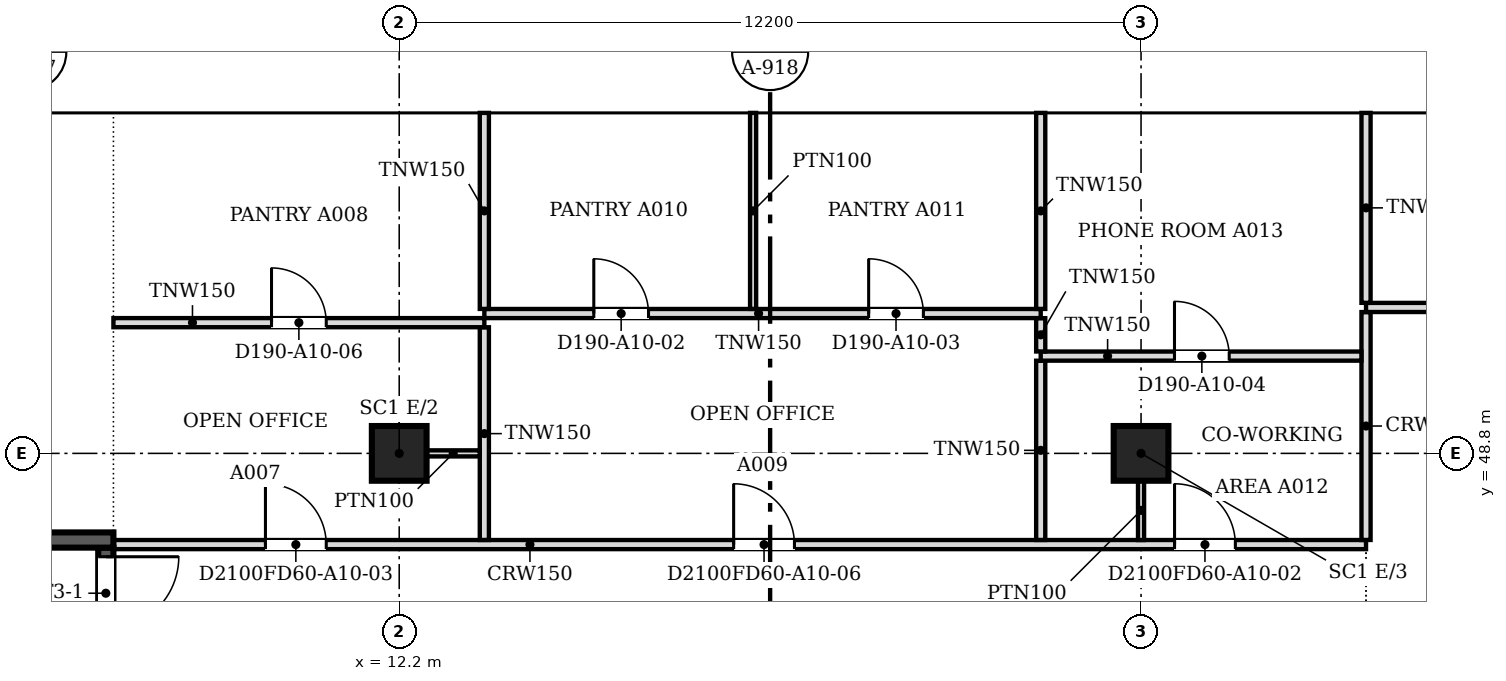
"""IFC4 building model, lengths in metres.
Left out: names, types, materials, properties, quantities, classifications, styles, units other than length and angle.
Written with IfcOpenShell. Run it as: python <this file> out.ifc"""

import sys

from ifc_helpers import new_model, si_unit, direction, frame, frame_2d, origin, origin_2d, place, context, subcontext, project, spatial, polyline, rectangle, outline, extrude, faceted_brep, source, transform, mapped, element, fill, save


model = new_model("IFC4")
c1 = context("Model", 3, precision=1e-05, world=origin(), true_north=direction((0.0, 1.0)))
c2 = subcontext(c1, "Body", "Model", "MODEL_VIEW")
j1 = project(units=[si_unit("LENGTHUNIT", "METRE"), si_unit("PLANEANGLEUNIT", "RADIAN")], contexts=[c1])
p1 = place(None, origin())
s1 = spatial("IfcSite", under=j1, at=p1, CompositionType="ELEMENT")
p2 = place(p1, origin())
s2 = spatial("IfcBuilding", under=s1, at=p2, CompositionType="ELEMENT")
p3 = place(p2, frame((0.0, 0.0, 116.4)))
s3 = spatial("IfcBuildingStorey", under=s2, at=p3, CompositionType="ELEMENT", Elevation=116.4)
for number, where, z_axis, x_axis in (
    (1, (12.2, 48.8, 0.0), (0.0, 0.0, 1.0), (1.0, 0.0, 0.0)),
    (2, (24.4, 48.8, 0.0), (0.0, 0.0, 1.0), (1.0, 0.0, 0.0)),
):
    element("IfcColumn", number, at=place(p3, frame(where, z_axis=z_axis, x_axis=x_axis)), inside=s3, PredefinedType="COLUMN", context=c2, shape_type="SweptSolid", body=[
        extrude(rectangle(XDim=0.9, YDim=0.9, at=origin_2d()), origin(), (0.0, 0.0, 1.0), 3.6),
    ])
m1 = source(origin(), c2, "Body", "SweptSolid", [
    extrude(outline(polyline([(3.05, 0.0), (6.1, 3.8), (3.05, 7.6), (0.0, 3.8), (3.05, 0.0)])), frame((0.0, 0.25, 0.0), z_axis=(0.0, -1.0, 0.0), x_axis=(1.0, 0.0, 0.0)), (0.0, 0.0, 1.0), 0.5),
])
p4 = place(p3, frame((30.5, 54.65, -3.8), z_axis=(0.0, 0.0, 1.0), x_axis=(-1.0, 0.0, 0.0)))
e3 = element("IfcWall", 3, at=p4, inside=s3, PredefinedType="SOLIDWALL", context=c2, shape_type="MappedRepresentation", body=[
    mapped(m1, transform((0.0, 0.0, 0.0), scale=1.0)),
])
m2 = source(origin(), c2, "Body", "SweptSolid", [
    extrude(outline(polyline([(3.05, 0.399), (5.78, 3.8), (3.05, 7.2), (0.321, 3.8), (3.05, 0.399)])), frame((0.0, 0.26, 0.0), z_axis=(0.0, -1.0, 0.0), x_axis=(1.0, 0.0, 0.0)), (0.0, 0.0, 1.0), 0.52),
])
p5 = place(p4, origin())
e4 = element("IfcOpeningElement", 4, at=p5, cuts=e3, PredefinedType="OPENING", context=c2, shape_type="MappedRepresentation", body=[
    mapped(m2, transform((0.0, 0.0, 0.0), scale=1.0)),
])
m3 = source(origin(), c2, "Body", "Brep", [
    faceted_brep([(3.05, -0.25, 0.0), (6.1, -0.25, 3.8), (6.1, -0.25, 3.8), (3.05, -0.25, 7.6), (0.0, -0.25, 3.8), (0.0, 0.25, 3.8), (3.05, 0.25, 7.6), (6.1, 0.25, 3.8), (6.1, 0.25, 3.8), (3.05, 0.25, 0.0)], [[[0, 1, 2, 3, 4]], [[5, 6, 7, 8, 9]], [[9, 8, 1, 0]], [[7, 6, 3, 2]], [[6, 5, 4, 3]], [[5, 9, 0, 4]], [[1, 8, 7, 2]]]),
])
p6 = place(p3, frame((24.4, 54.65, -3.8), z_axis=(0.0, 0.0, 1.0), x_axis=(-1.0, 0.0, 0.0)))
e5 = element("IfcWall", 5, at=p6, inside=s3, PredefinedType="SOLIDWALL", context=c2, shape_type="MappedRepresentation", body=[
    mapped(m3, transform((0.0, 0.0, 0.0), scale=1.0)),
])
p7 = place(p6, origin())
e6 = element("IfcOpeningElement", 6, at=p7, cuts=e5, PredefinedType="OPENING", context=c2, shape_type="MappedRepresentation", body=[
    mapped(m2, transform((0.0, 0.0, 0.0), scale=1.0)),
])
p8 = place(p3, frame((18.3, 54.65, -3.8), z_axis=(0.0, 0.0, 1.0), x_axis=(-1.0, 0.0, 0.0)))
e7 = element("IfcWall", 7, at=p8, inside=s3, PredefinedType="SOLIDWALL", context=c2, shape_type="MappedRepresentation", body=[
    mapped(m1, transform((0.0, 0.0, 0.0), scale=1.0)),
])
p9 = place(p8, origin())
e8 = element("IfcOpeningElement", 8, at=p9, cuts=e7, PredefinedType="OPENING", context=c2, shape_type="MappedRepresentation", body=[
    mapped(m2, transform((0.0, 0.0, 0.0), scale=1.0)),
])
m4 = source(origin(), c2, "Body", "Brep", [
    faceted_brep([(3.05, -0.25, 0.0), (6.053, -0.25, 3.8), (3.05, -0.25, 7.6), (0.0, -0.25, 3.8), (0.0, 0.25, 3.8), (3.05, 0.25, 7.6), (6.007, 0.25, 3.859), (6.007, 0.25, 3.741), (3.05, 0.25, 0.0), (6.053, 0.0, 3.8)], [[[0, 1, 2, 3]], [[4, 5, 6, 7, 8]], [[8, 7, 9, 1, 0]], [[6, 5, 2, 1, 9]], [[5, 4, 3, 2]], [[4, 8, 0, 3]], [[9, 7, 6]]]),
])
p10 = place(p3, frame((12.2, 54.65, -3.8), z_axis=(0.0, 0.0, 1.0), x_axis=(-1.0, 0.0, 0.0)))
e9 = element("IfcWall", 9, at=p10, inside=s3, PredefinedType="SOLIDWALL", context=c2, shape_type="MappedRepresentation", body=[
    mapped(m4, transform((0.0, 0.0, 0.0), scale=1.0)),
])
m5 = source(origin(), c2, "Body", "SweptSolid", [
    extrude(outline(polyline([(3.049, 0.401), (5.735, 3.8), (3.049, 7.199), (0.321, 3.8), (3.049, 0.401)])), frame((0.0, 0.26, 0.0), z_axis=(0.0, -1.0, 0.0), x_axis=(1.0, 0.0, 0.0)), (0.0, 0.0, 1.0), 0.52),
])
p11 = place(p10, origin())
e10 = element("IfcOpeningElement", 10, at=p11, cuts=e9, PredefinedType="OPENING", context=c2, shape_type="MappedRepresentation", body=[
    mapped(m5, transform((0.0, 0.0, 0.0), scale=1.0)),
])
p12 = place(p2, frame((0.0, 0.0, 120.2)))
s4 = spatial("IfcBuildingStorey", under=s2, at=p12, CompositionType="ELEMENT", Elevation=120.2)
m6 = source(origin(), c2, "Body", "SweptSolid", [
    extrude(outline(polyline([(3.05, 0.0), (6.1, 3.8), (3.05, 7.6), (0.0, 3.8), (3.05, 0.0)])), frame((0.0, 0.25, 0.0), z_axis=(0.0, -1.0, 0.0), x_axis=(1.0, 0.0, 0.0)), (0.0, 0.0, 1.0), 0.5),
])
p13 = place(p12, frame((33.55, 54.65, -3.8), z_axis=(0.0, 0.0, 1.0), x_axis=(-1.0, 0.0, 0.0)))
e11 = element("IfcWall", 11, at=p13, inside=s4, PredefinedType="SOLIDWALL", context=c2, shape_type="MappedRepresentation", body=[
    mapped(m6, transform((0.0, 0.0, 0.0), scale=1.0)),
])
m7 = source(origin(), c2, "Body", "SweptSolid", [
    extrude(outline(polyline([(3.05, 0.399), (5.78, 3.8), (3.05, 7.201), (0.321, 3.8), (3.05, 0.399)])), frame((0.0, 0.26, 0.0), z_axis=(0.0, -1.0, 0.0), x_axis=(1.0, 0.0, 0.0)), (0.0, 0.0, 1.0), 0.52),
])
p14 = place(p13, origin())
e12 = element("IfcOpeningElement", 12, at=p14, cuts=e11, PredefinedType="OPENING", context=c2, shape_type="MappedRepresentation", body=[
    mapped(m7, transform((0.0, 0.0, 0.0), scale=1.0)),
])
m8 = source(origin(), c2, "Body", "Brep", [
    faceted_brep([(3.05, -0.25, 0.0), (6.1, -0.25, 3.8), (6.1, -0.25, 3.8), (3.05, -0.25, 7.6), (0.0, -0.25, 3.8), (0.0, 0.25, 3.8), (3.05, 0.25, 7.6), (6.1, 0.25, 3.8), (6.1, 0.25, 3.8), (3.05, 0.25, 0.0)], [[[0, 1, 2, 3, 4]], [[5, 6, 7, 8, 9]], [[9, 8, 1, 0]], [[7, 6, 3, 2]], [[6, 5, 4, 3]], [[5, 9, 0, 4]], [[1, 8, 7, 2]]]),
])
p15 = place(p12, frame((27.45, 54.65, -3.8), z_axis=(0.0, 0.0, 1.0), x_axis=(-1.0, 0.0, 0.0)))
e13 = element("IfcWall", 13, at=p15, inside=s4, PredefinedType="SOLIDWALL", context=c2, shape_type="MappedRepresentation", body=[
    mapped(m8, transform((0.0, 0.0, 0.0), scale=1.0)),
])
p16 = place(p15, origin())
e14 = element("IfcOpeningElement", 14, at=p16, cuts=e13, PredefinedType="OPENING", context=c2, shape_type="MappedRepresentation", body=[
    mapped(m7, transform((0.0, 0.0, 0.0), scale=1.0)),
])
p17 = place(p12, frame((21.35, 54.65, -3.8), z_axis=(0.0, 0.0, 1.0), x_axis=(-1.0, 0.0, 0.0)))
e15 = element("IfcWall", 15, at=p17, inside=s4, PredefinedType="SOLIDWALL", context=c2, shape_type="MappedRepresentation", body=[
    mapped(m6, transform((0.0, 0.0, 0.0), scale=1.0)),
])
p18 = place(p17, origin())
e16 = element("IfcOpeningElement", 16, at=p18, cuts=e15, PredefinedType="OPENING", context=c2, shape_type="MappedRepresentation", body=[
    mapped(m7, transform((0.0, 0.0, 0.0), scale=1.0)),
])
p19 = place(p12, frame((15.25, 54.65, -3.8), z_axis=(0.0, 0.0, 1.0), x_axis=(-1.0, 0.0, 0.0)))
e17 = element("IfcWall", 17, at=p19, inside=s4, PredefinedType="SOLIDWALL", context=c2, shape_type="MappedRepresentation", body=[
    mapped(m6, transform((0.0, 0.0, 0.0), scale=1.0)),
])
p20 = place(p19, origin())
e18 = element("IfcOpeningElement", 18, at=p20, cuts=e17, PredefinedType="OPENING", context=c2, shape_type="MappedRepresentation", body=[
    mapped(m7, transform((0.0, 0.0, 0.0), scale=1.0)),
])
m9 = source(origin(), c2, "Body", "Brep", [
    faceted_brep([(3.003, -0.25, 0.0), (3.05, -0.25, 0.06), (3.05, -0.25, 7.54), (3.003, -0.25, 7.6), (0.0, -0.25, 3.8), (0.0, 0.25, 3.8), (2.957, 0.25, 7.541), (2.957, 0.25, 0.059), (3.003, 0.0, 0.0), (3.003, 0.0, 7.6)], [[[0, 1, 2, 3, 4]], [[5, 6, 7]], [[1, 0, 8]], [[9, 3, 2]], [[6, 5, 4, 3, 9]], [[5, 7, 8, 0, 4]], [[1, 8, 7, 6, 9, 2]]]),
])
p21 = place(p12, frame((9.15, 54.65, -3.8), z_axis=(0.0, 0.0, 1.0), x_axis=(-1.0, 0.0, 0.0)))
e19 = element("IfcWall", 19, at=p21, inside=s4, PredefinedType="SOLIDWALL", context=c2, shape_type="MappedRepresentation", body=[
    mapped(m9, transform((0.0, 0.0, 0.0), scale=1.0)),
])
m10 = source(origin(), c2, "Body", "SweptSolid", [
    extrude(outline(polyline([(2.803, 6.944), (0.319, 3.8), (2.803, 0.656), (2.803, 6.944)])), frame((0.0, 0.26, 0.0), z_axis=(0.0, -1.0, 0.0), x_axis=(1.0, 0.0, 0.0)), (0.0, 0.0, 1.0), 0.52),
])
p22 = place(p21, origin())
e20 = element("IfcOpeningElement", 20, at=p22, cuts=e19, PredefinedType="OPENING", context=c2, shape_type="MappedRepresentation", body=[
    mapped(m10, transform((0.0, 0.0, 0.0), scale=1.0)),
])
p23 = place(p3, frame((3.6, 47.375, 0.0), z_axis=(0.0, 0.0, 1.0), x_axis=(1.0, 0.0, 0.0)))
e21 = element("IfcWall", 21, at=p23, inside=s3, PredefinedType="SOLIDWALL", context=c2, shape_type="SweptSolid", body=[
    extrude(rectangle(XDim=3.9, YDim=0.25, at=frame_2d((1.95, 0.0))), origin(), (0.0, 0.0, 1.0), 3.8),
])
p24 = place(p3, frame((7.375, 47.25, 0.0), z_axis=(0.0, 0.0, 1.0), x_axis=(0.0, -1.0, 0.0)))
e22 = element("IfcWall", 22, at=p24, inside=s3, PredefinedType="SOLIDWALL", context=c2, shape_type="SweptSolid", body=[
    extrude(rectangle(XDim=8.0, YDim=0.25, at=frame_2d((4.0, 0.0))), origin(), (0.0, 0.0, 1.0), 3.8),
])
m11 = source(origin(), c2, "Body", "SweptSolid", [
    extrude(rectangle(XDim=1.2, YDim=2.1, at=frame_2d((0.6, 1.05))), frame((0.0, 0.135, 0.0), z_axis=(0.0, -1.0, 0.0), x_axis=(1.0, 0.0, 0.0)), (0.0, 0.0, 1.0), 0.27),
])
p25 = place(p24, frame((0.15, 0.0, 0.0)))
e23 = element("IfcOpeningElement", 23, at=p25, cuts=e22, PredefinedType="OPENING", context=c2, shape_type="MappedRepresentation", body=[
    mapped(m11, transform((0.0, 0.0, 0.0), scale=1.0)),
])
p26 = place(p3, frame((7.5, 47.3, 0.0), z_axis=(0.0, 0.0, 1.0), x_axis=(1.0, 0.0, 0.0)))
e24 = element("IfcWall", 24, at=p26, inside=s3, PredefinedType="PARTITIONING", context=c2, shape_type="SweptSolid", body=[
    extrude(rectangle(XDim=20.6, YDim=0.15, at=frame_2d((10.3, 0.0))), origin(), (0.0, 0.0, 1.0), 3.067),
])
m12 = source(origin(), c2, "Body", "SweptSolid", [
    extrude(rectangle(XDim=1.0, YDim=2.1, at=frame_2d((0.5, 1.05))), frame((0.0, 0.085, 0.0), z_axis=(0.0, -1.0, 0.0), x_axis=(1.0, 0.0, 0.0)), (0.0, 0.0, 1.0), 0.17),
])
p27 = place(p26, frame((17.451, 0.0, 0.0)))
e25 = element("IfcOpeningElement", 25, at=p27, cuts=e24, PredefinedType="OPENING", context=c2, shape_type="MappedRepresentation", body=[
    mapped(m12, transform((0.0, 0.0, 0.0), scale=1.0)),
])
p28 = place(p26, frame((2.5, 0.0, 0.0)))
e26 = element("IfcOpeningElement", 26, at=p28, cuts=e24, PredefinedType="OPENING", context=c2, shape_type="MappedRepresentation", body=[
    mapped(m12, transform((0.0, 0.0, 0.0), scale=1.0)),
])
p29 = place(p26, frame((10.2, 0.0, 0.0)))
e27 = element("IfcOpeningElement", 27, at=p29, cuts=e24, PredefinedType="OPENING", context=c2, shape_type="MappedRepresentation", body=[
    mapped(m12, transform((0.0, 0.0, 0.0), scale=1.0)),
])
p30 = place(p3, frame((13.6, 47.376, 0.0), z_axis=(0.0, 0.0, 1.0), x_axis=(0.0, 1.0, 0.0)))
e28 = element("IfcWall", 28, at=p30, inside=s3, PredefinedType="PARTITIONING", context=c2, shape_type="SweptSolid", body=[
    extrude(rectangle(XDim=3.498, YDim=0.15, at=frame_2d((1.749, 0.0))), origin(), (0.0, 0.0, 1.0), 3.067),
])
p31 = place(p3, frame((22.75, 47.376, 0.0), z_axis=(0.0, 0.0, 1.0), x_axis=(0.0, 1.0, 0.0)))
e29 = element("IfcWall", 29, at=p31, inside=s3, PredefinedType="PARTITIONING", context=c2, shape_type="SweptSolid", body=[
    extrude(rectangle(XDim=2.948, YDim=0.15, at=frame_2d((1.474, 0.0))), origin(), (0.0, 0.0, 1.0), 3.067),
])
p32 = place(p3, frame((28.1, 47.376, 0.0), z_axis=(0.0, 0.0, 1.0), x_axis=(0.0, 1.0, 0.0)))
e30 = element("IfcWall", 30, at=p32, inside=s3, PredefinedType="PARTITIONING", context=c2, shape_type="SweptSolid", body=[
    extrude(rectangle(XDim=3.748, YDim=0.15, at=frame_2d((1.874, 0.0))), origin(), (0.0, 0.0, 1.0), 3.067),
])
p33 = place(p3, frame((24.4, 48.35, 0.0), z_axis=(0.0, 0.0, 1.0), x_axis=(0.0, -1.0, 0.0)))
e31 = element("IfcWall", 31, at=p33, inside=s3, PredefinedType="PARTITIONING", context=c2, shape_type="SweptSolid", body=[
    extrude(rectangle(XDim=0.975, YDim=0.1, at=frame_2d((0.488, 0.0))), origin(), (0.0, 0.0, 1.0), 3.067),
])
p34 = place(p3, frame((12.65, 48.8, 0.0), z_axis=(0.0, 0.0, 1.0), x_axis=(1.0, 0.0, 0.0)))
e32 = element("IfcWall", 32, at=p34, inside=s3, PredefinedType="PARTITIONING", context=c2, shape_type="SweptSolid", body=[
    extrude(rectangle(XDim=0.875, YDim=0.1, at=frame_2d((0.438, 0.0))), origin(), (0.0, 0.0, 1.0), 3.067),
])
p35 = place(p3, frame((22.75, 50.4, 0.0), z_axis=(0.0, 0.0, 1.0), x_axis=(1.0, 0.0, 0.0)))
e33 = element("IfcWall", 33, at=p35, inside=s3, PredefinedType="PARTITIONING", context=c2, shape_type="SweptSolid", body=[
    extrude(rectangle(XDim=5.274, YDim=0.15, at=frame_2d((2.637, 0.0))), origin(), (0.0, 0.0, 1.0), 3.067),
])
m13 = source(origin(), c2, "Body", "SweptSolid", [
    extrude(rectangle(XDim=0.9, YDim=2.1, at=frame_2d((0.45, 1.05))), frame((0.0, 0.085, 0.0), z_axis=(0.0, -1.0, 0.0), x_axis=(1.0, 0.0, 0.0)), (0.0, 0.0, 1.0), 0.17),
])
p36 = place(p35, frame((2.2, 0.0, 0.0)))
e34 = element("IfcOpeningElement", 34, at=p36, cuts=e33, PredefinedType="OPENING", context=c2, shape_type="MappedRepresentation", body=[
    mapped(m13, transform((0.0, 0.0, 0.0), scale=1.0)),
])
p37 = place(p3, frame((22.75, 50.476, 0.0), z_axis=(0.0, 0.0, 1.0), x_axis=(0.0, 1.0, 0.0)))
e35 = element("IfcWall", 35, at=p37, inside=s3, PredefinedType="PARTITIONING", context=c2, shape_type="SweptSolid", body=[
    extrude(rectangle(XDim=0.548, YDim=0.15, at=frame_2d((0.274, 0.0))), origin(), (0.0, 0.0, 1.0), 3.067),
])
p38 = place(p3, frame((7.5, 50.95, 0.0), z_axis=(0.0, 0.0, 1.0), x_axis=(1.0, 0.0, 0.0)))
e36 = element("IfcWall", 36, at=p38, inside=s3, PredefinedType="PARTITIONING", context=c2, shape_type="SweptSolid", body=[
    extrude(rectangle(XDim=6.1, YDim=0.15, at=frame_2d((3.05, 0.0))), origin(), (0.0, 0.0, 1.0), 3.067),
])
p39 = place(p38, frame((2.6, 0.0, 0.0)))
e37 = element("IfcOpeningElement", 37, at=p39, cuts=e36, PredefinedType="OPENING", context=c2, shape_type="MappedRepresentation", body=[
    mapped(m13, transform((0.0, 0.0, 0.0), scale=1.0)),
])
p40 = place(p3, frame((13.6, 51.1, 0.0), z_axis=(0.0, 0.0, 1.0), x_axis=(1.0, 0.0, 0.0)))
e38 = element("IfcWall", 38, at=p40, inside=s3, PredefinedType="PARTITIONING", context=c2, shape_type="SweptSolid", body=[
    extrude(rectangle(XDim=9.15, YDim=0.15, at=frame_2d((4.575, 0.0))), origin(), (0.0, 0.0, 1.0), 3.067),
])
p41 = place(p40, frame((1.8, 0.0, 0.0)))
e39 = element("IfcOpeningElement", 39, at=p41, cuts=e38, PredefinedType="OPENING", context=c2, shape_type="MappedRepresentation", body=[
    mapped(m13, transform((0.0, 0.0, 0.0), scale=1.0)),
])
p42 = place(p40, frame((6.32, 0.0, 0.0)))
e40 = element("IfcOpeningElement", 40, at=p42, cuts=e38, PredefinedType="OPENING", context=c2, shape_type="MappedRepresentation", body=[
    mapped(m13, transform((0.0, 0.0, 0.0), scale=1.0)),
])
p43 = place(p3, frame((13.6, 51.176, 0.0), z_axis=(0.0, 0.0, 1.0), x_axis=(0.0, 1.0, 0.0)))
e41 = element("IfcWall", 41, at=p43, inside=s3, PredefinedType="PARTITIONING", context=c2, shape_type="SweptSolid", body=[
    extrude(rectangle(XDim=3.224, YDim=0.15, at=frame_2d((1.612, 0.0))), origin(), (0.0, 0.0, 1.0), 3.067),
])
p44 = place(p3, frame((18.02, 51.176, 0.0), z_axis=(0.0, 0.0, 1.0), x_axis=(0.0, 1.0, 0.0)))
e42 = element("IfcWall", 42, at=p44, inside=s3, PredefinedType="PARTITIONING", context=c2, shape_type="SweptSolid", body=[
    extrude(rectangle(XDim=3.224, YDim=0.1, at=frame_2d((1.612, 0.0))), origin(), (0.0, 0.0, 1.0), 3.067),
])
p45 = place(p3, frame((22.75, 51.176, 0.0), z_axis=(0.0, 0.0, 1.0), x_axis=(0.0, 1.0, 0.0)))
e43 = element("IfcWall", 43, at=p45, inside=s3, PredefinedType="PARTITIONING", context=c2, shape_type="SweptSolid", body=[
    extrude(rectangle(XDim=3.224, YDim=0.15, at=frame_2d((1.612, 0.0))), origin(), (0.0, 0.0, 1.0), 3.067),
])
p46 = place(p3, frame((28.1, 51.2, 0.0), z_axis=(0.0, 0.0, 1.0), x_axis=(1.0, 0.0, 0.0)))
e44 = element("IfcWall", 44, at=p46, inside=s3, PredefinedType="PARTITIONING", context=c2, shape_type="SweptSolid", body=[
    extrude(rectangle(XDim=31.438, YDim=0.15, at=frame_2d((15.719, 0.0))), origin(), (0.0, 0.0, 1.0), 3.067),
])
p47 = place(p46, frame((5.6, 0.0, 0.0)))
e45 = element("IfcOpeningElement", 45, at=p47, cuts=e44, PredefinedType="OPENING", context=c2, shape_type="MappedRepresentation", body=[
    mapped(m13, transform((0.0, 0.0, 0.0), scale=1.0)),
])
p48 = place(p46, frame((21.4, 0.0, 0.0)))
e46 = element("IfcOpeningElement", 46, at=p48, cuts=e44, PredefinedType="OPENING", context=c2, shape_type="MappedRepresentation", body=[
    mapped(m13, transform((0.0, 0.0, 0.0), scale=1.0)),
])
p49 = place(p3, frame((28.1, 51.276, 0.0), z_axis=(0.0, 0.0, 1.0), x_axis=(0.0, 1.0, 0.0)))
e47 = element("IfcWall", 47, at=p49, inside=s3, PredefinedType="PARTITIONING", context=c2, shape_type="SweptSolid", body=[
    extrude(rectangle(XDim=3.124, YDim=0.15, at=frame_2d((1.562, 0.0))), origin(), (0.0, 0.0, 1.0), 3.067),
])
m14 = source(origin(), c2, "Body", "SweptSolid", [
    extrude(rectangle(XDim=1.2, YDim=2.1, at=frame_2d((0.6, 1.05))), frame((0.0, 0.025, 0.0), z_axis=(0.0, -1.0, 0.0), x_axis=(1.0, 0.0, 0.0)), (0.0, 0.0, 1.0), 0.05),
])
p50 = place(p25, origin())
e48 = element("IfcDoor", 48, at=p50, inside=s3, OperationType="SINGLE_SWING_LEFT", PredefinedType="DOOR", context=c2, shape_type="MappedRepresentation", body=[
    mapped(m14, transform((0.0, 0.0, 0.0), scale=1.0)),
])
fill(e23, e48)
m15 = source(origin(), c2, "Body", "SweptSolid", [
    extrude(rectangle(XDim=0.9, YDim=2.1, at=frame_2d((0.45, 1.05))), frame((0.0, 0.025, 0.0), z_axis=(0.0, -1.0, 0.0), x_axis=(1.0, 0.0, 0.0)), (0.0, 0.0, 1.0), 0.05),
])
p51 = place(p41, origin())
e49 = element("IfcDoor", 49, at=p51, inside=s3, OperationType="SINGLE_SWING_LEFT", PredefinedType="DOOR", context=c2, shape_type="MappedRepresentation", body=[
    mapped(m15, transform((0.0, 0.0, 0.0), scale=1.0)),
])
fill(e39, e49)
p52 = place(p42, origin())
e50 = element("IfcDoor", 50, at=p52, inside=s3, OperationType="SINGLE_SWING_LEFT", PredefinedType="DOOR", context=c2, shape_type="MappedRepresentation", body=[
    mapped(m15, transform((0.0, 0.0, 0.0), scale=1.0)),
])
fill(e40, e50)
p53 = place(p36, origin())
e51 = element("IfcDoor", 51, at=p53, inside=s3, OperationType="SINGLE_SWING_LEFT", PredefinedType="DOOR", context=c2, shape_type="MappedRepresentation", body=[
    mapped(m15, transform((0.0, 0.0, 0.0), scale=1.0)),
])
fill(e34, e51)
m16 = source(origin(), c2, "Body", "SweptSolid", [
    extrude(rectangle(XDim=1.0, YDim=2.1, at=frame_2d((0.5, 1.05))), frame((0.0, 0.025, 0.0), z_axis=(0.0, -1.0, 0.0), x_axis=(1.0, 0.0, 0.0)), (0.0, 0.0, 1.0), 0.05),
])
p54 = place(p27, origin())
e52 = element("IfcDoor", 52, at=p54, inside=s3, OperationType="SINGLE_SWING_LEFT", PredefinedType="DOOR", context=c2, shape_type="MappedRepresentation", body=[
    mapped(m16, transform((0.0, 0.0, 0.0), scale=1.0)),
])
fill(e25, e52)
p55 = place(p28, origin())
e53 = element("IfcDoor", 53, at=p55, inside=s3, OperationType="SINGLE_SWING_LEFT", PredefinedType="DOOR", context=c2, shape_type="MappedRepresentation", body=[
    mapped(m16, transform((0.0, 0.0, 0.0), scale=1.0)),
])
fill(e26, e53)
p56 = place(p39, origin())
e54 = element("IfcDoor", 54, at=p56, inside=s3, OperationType="SINGLE_SWING_LEFT", PredefinedType="DOOR", context=c2, shape_type="MappedRepresentation", body=[
    mapped(m15, transform((0.0, 0.0, 0.0), scale=1.0)),
])
fill(e37, e54)
p57 = place(p29, origin())
e55 = element("IfcDoor", 55, at=p57, inside=s3, OperationType="SINGLE_SWING_LEFT", PredefinedType="DOOR", context=c2, shape_type="MappedRepresentation", body=[
    mapped(m16, transform((0.0, 0.0, 0.0), scale=1.0)),
])
fill(e27, e55)
save(model, sys.argv[1])
